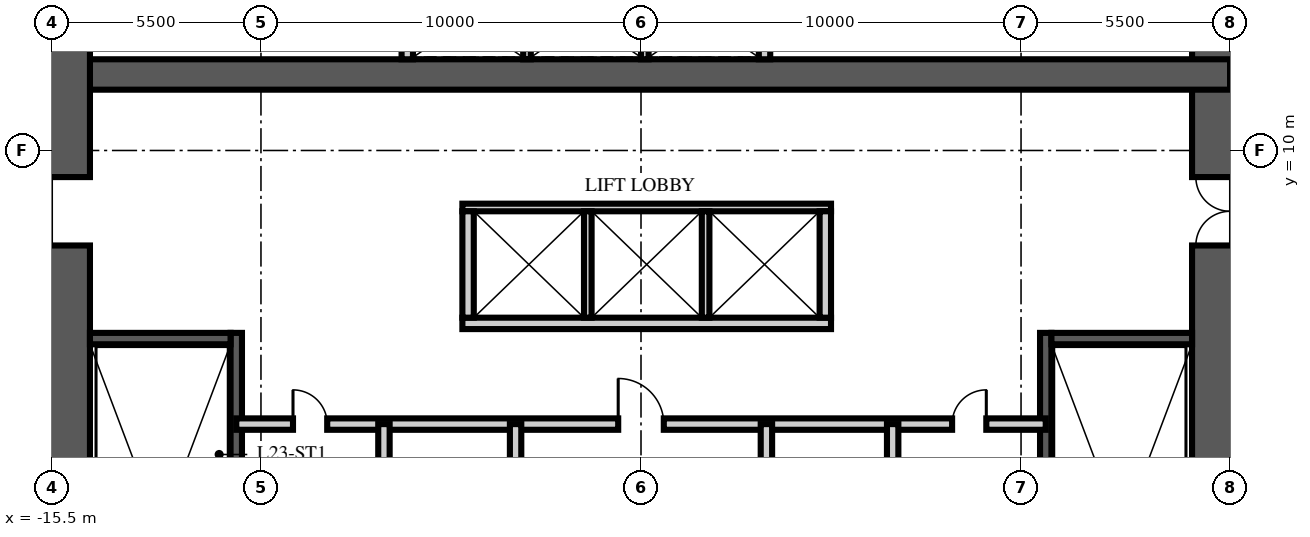
"""IFC4 building model, lengths in metres.
Left out: names, types, materials, properties, quantities, classifications, styles, units other than length and angle.
Written with IfcOpenShell. Run it as: python <this file> out.ifc"""

import sys

from ifc_helpers import new_model, si_unit, direction, frame, frame_2d, origin, place, context, subcontext, project, spatial, rectangle, extrude, element, fill, save


model = new_model("IFC4")
c1 = context("Model", 3, precision=1e-05, world=origin(), true_north=direction((0.0, 1.0)))
c2 = subcontext(c1, "Body", "Model", "MODEL_VIEW")
j1 = project(units=[si_unit("LENGTHUNIT", "METRE"), si_unit("PLANEANGLEUNIT", "RADIAN")], contexts=[c1])
p1 = place(None, origin())
s1 = spatial("IfcSite", under=j1, at=p1, CompositionType="ELEMENT")
p2 = place(p1, origin())
s2 = spatial("IfcBuilding", under=s1, at=p2, CompositionType="ELEMENT")
p3 = place(p2, frame((0.0, 0.0, 92.25)))
s3 = spatial("IfcBuildingStorey", under=s2, at=p3, CompositionType="ELEMENT", Elevation=92.25)
p4 = place(p3, frame((15.5, -15.5, -0.25), z_axis=(0.0, 0.0, 1.0), x_axis=(0.0, 1.0, 0.0)))
e1 = element("IfcWall", 1, at=p4, inside=s3, PredefinedType="SHEAR", context=c2, shape_type="SweptSolid", body=[
    extrude(rectangle(XDim=31.0, YDim=2.0, at=frame_2d((15.5, 0.0))), origin(), (0.0, 0.0, 1.0), 3.75),
])
p5 = place(p4, frame((6.5, 0.0, 0.25)))
e2 = element("IfcOpeningElement", 2, at=p5, cuts=e1, PredefinedType="OPENING", context=c2, shape_type="SweptSolid", body=[
    extrude(rectangle(XDim=1.2, YDim=2.1, at=frame_2d((0.6, 1.05))), frame((0.0, 1.01, 0.0), z_axis=(0.0, -1.0, 0.0), x_axis=(1.0, 0.0, 0.0)), (0.0, 0.0, 1.0), 2.02),
])
p6 = place(p4, frame((23.0, 0.0, 0.25)))
e3 = element("IfcOpeningElement", 3, at=p6, cuts=e1, PredefinedType="OPENING", context=c2, shape_type="SweptSolid", body=[
    extrude(rectangle(XDim=1.8, YDim=2.1, at=frame_2d((0.9, 1.05))), frame((0.0, 1.01, 0.0), z_axis=(0.0, -1.0, 0.0), x_axis=(1.0, 0.0, 0.0)), (0.0, 0.0, 1.0), 2.02),
])
p7 = place(p3, frame((-15.5, 12.0, -0.25), z_axis=(0.0, 0.0, 1.0), x_axis=(1.0, 0.0, 0.0)))
e4 = element("IfcWall", 4, at=p7, inside=s3, PredefinedType="SHEAR", context=c2, shape_type="SweptSolid", body=[
    extrude(rectangle(XDim=31.0, YDim=0.8, at=frame_2d((15.5, 0.0))), origin(), (0.0, 0.0, 1.0), 3.75),
])
p8 = place(p3, frame((-15.5, -15.5, -0.25), z_axis=(0.0, 0.0, 1.0), x_axis=(0.0, 1.0, 0.0)))
e5 = element("IfcWall", 5, at=p8, inside=s3, PredefinedType="SHEAR", context=c2, shape_type="SweptSolid", body=[
    extrude(rectangle(XDim=31.0, YDim=2.0, at=frame_2d((15.5, 0.0))), origin(), (0.0, 0.0, 1.0), 3.75),
])
p9 = place(p8, frame((6.5, 0.0, 0.25)))
e6 = element("IfcOpeningElement", 6, at=p9, cuts=e5, PredefinedType="OPENING", context=c2, shape_type="SweptSolid", body=[
    extrude(rectangle(XDim=1.2, YDim=2.1, at=frame_2d((0.6, 1.05))), frame((0.0, 1.01, 0.0), z_axis=(0.0, -1.0, 0.0), x_axis=(1.0, 0.0, 0.0)), (0.0, 0.0, 1.0), 2.02),
])
p10 = place(p8, frame((23.0, 0.0, 0.25)))
e7 = element("IfcOpeningElement", 7, at=p10, cuts=e5, PredefinedType="OPENING", context=c2, shape_type="SweptSolid", body=[
    extrude(rectangle(XDim=1.8, YDim=2.1, at=frame_2d((0.9, 1.05))), frame((0.0, 1.01, 0.0), z_axis=(0.0, -1.0, 0.0), x_axis=(1.0, 0.0, 0.0)), (0.0, 0.0, 1.0), 2.02),
])
p11 = place(p3, frame((-10.65, -4.9, 0.0), z_axis=(0.0, 0.0, 1.0), x_axis=(0.0, 1.0, 0.0)))
e8 = element("IfcWall", 8, at=p11, inside=s3, PredefinedType="SOLIDWALL", context=c2, shape_type="SweptSolid", body=[
    extrude(rectangle(XDim=10.1, YDim=0.3, at=frame_2d((5.05, 0.0))), origin(), (0.0, 0.0, 1.0), 3.5),
])
p12 = place(p3, frame((-14.5, 5.05, 0.0), z_axis=(0.0, 0.0, 1.0), x_axis=(1.0, 0.0, 0.0)))
e9 = element("IfcWall", 9, at=p12, inside=s3, PredefinedType="SOLIDWALL", context=c2, shape_type="SweptSolid", body=[
    extrude(rectangle(XDim=3.7, YDim=0.3, at=frame_2d((1.85, 0.0))), origin(), (0.0, 0.0, 1.0), 3.5),
])
p13 = place(p3, frame((10.65, -4.9, 0.0), z_axis=(0.0, 0.0, 1.0), x_axis=(0.0, 1.0, 0.0)))
e10 = element("IfcWall", 10, at=p13, inside=s3, PredefinedType="SOLIDWALL", context=c2, shape_type="SweptSolid", body=[
    extrude(rectangle(XDim=10.1, YDim=0.3, at=frame_2d((5.05, 0.0))), origin(), (0.0, 0.0, 1.0), 3.5),
])
p14 = place(p3, frame((14.5, 5.05, 0.0), z_axis=(0.0, 0.0, 1.0), x_axis=(-1.0, 0.0, 0.0)))
e11 = element("IfcWall", 11, at=p14, inside=s3, PredefinedType="SOLIDWALL", context=c2, shape_type="SweptSolid", body=[
    extrude(rectangle(XDim=3.7, YDim=0.3, at=frame_2d((1.85, 0.0))), origin(), (0.0, 0.0, 1.0), 3.5),
])
p15 = place(p3, frame((-4.7, 5.45, 0.0), z_axis=(0.0, 0.0, 1.0), x_axis=(1.0, 0.0, 0.0)))
e12 = element("IfcWall", 12, at=p15, inside=s3, PredefinedType="PARTITIONING", context=c2, shape_type="SweptSolid", body=[
    extrude(rectangle(XDim=9.7, YDim=0.3, at=frame_2d((4.85, 0.0))), origin(), (0.0, 0.0, 1.0), 3.5),
])
p16 = place(p3, frame((-4.7, 8.5, 0.0), z_axis=(0.0, 0.0, 1.0), x_axis=(1.0, 0.0, 0.0)))
e13 = element("IfcWall", 13, at=p16, inside=s3, PredefinedType="PARTITIONING", context=c2, shape_type="SweptSolid", body=[
    extrude(rectangle(XDim=9.7, YDim=0.2, at=frame_2d((4.85, 0.0))), origin(), (0.0, 0.0, 1.0), 3.5),
])
for number, where, z_axis, x_axis in (
    (14, (-4.55, 5.6, 0.0), (0.0, 0.0, 1.0), (0.0, 1.0, 0.0)),
    (15, (4.85, 5.6, 0.0), (0.0, 0.0, 1.0), (0.0, 1.0, 0.0)),
):
    element("IfcWall", number, at=place(p3, frame(where, z_axis=z_axis, x_axis=x_axis)), inside=s3, PredefinedType="PARTITIONING", context=c2, shape_type="SweptSolid", body=[
        extrude(rectangle(XDim=2.8, YDim=0.3, at=frame_2d((1.4, 0.0))), origin(), (0.0, 0.0, 1.0), 3.5),
    ])
for number, where, z_axis, x_axis in (
    (16, (-1.4, 5.6, 0.0), (0.0, 0.0, 1.0), (0.0, 1.0, 0.0)),
    (17, (1.7, 5.6, 0.0), (0.0, 0.0, 1.0), (0.0, 1.0, 0.0)),
):
    element("IfcWall", number, at=place(p3, frame(where, z_axis=z_axis, x_axis=x_axis)), inside=s3, PredefinedType="PARTITIONING", context=c2, shape_type="SweptSolid", body=[
        extrude(rectangle(XDim=2.8, YDim=0.2, at=frame_2d((1.4, 0.0))), origin(), (0.0, 0.0, 1.0), 3.5),
    ])
for number, where, z_axis, x_axis in (
    (18, (-6.15, 12.4, 0.0), (0.0, 0.0, 1.0), (0.0, 1.0, 0.0)),
    (19, (3.25, 12.4, 0.0), (0.0, 0.0, 1.0), (0.0, 1.0, 0.0)),
):
    element("IfcWall", number, at=place(p3, frame(where, z_axis=z_axis, x_axis=x_axis)), inside=s3, PredefinedType="PARTITIONING", context=c2, shape_type="SweptSolid", body=[
        extrude(rectangle(XDim=2.1, YDim=0.3, at=frame_2d((1.05, 0.0))), origin(), (0.0, 0.0, 1.0), 3.5),
    ])
for number, where, z_axis, x_axis in (
    (20, (-3.0, 12.4, 0.0), (0.0, 0.0, 1.0), (0.0, 1.0, 0.0)),
    (21, (0.1, 12.4, 0.0), (0.0, 0.0, 1.0), (0.0, 1.0, 0.0)),
):
    element("IfcWall", number, at=place(p3, frame(where, z_axis=z_axis, x_axis=x_axis)), inside=s3, PredefinedType="PARTITIONING", context=c2, shape_type="SweptSolid", body=[
        extrude(rectangle(XDim=2.1, YDim=0.2, at=frame_2d((1.05, 0.0))), origin(), (0.0, 0.0, 1.0), 3.5),
    ])
p17 = place(p3, frame((-10.65, 2.8, 0.0), z_axis=(0.0, 0.0, 1.0), x_axis=(1.0, 0.0, 0.0)))
e22 = element("IfcWall", 22, at=p17, inside=s3, PredefinedType="PARTITIONING", context=c2, shape_type="SweptSolid", body=[
    extrude(rectangle(XDim=21.3, YDim=0.3, at=frame_2d((10.65, 0.0))), origin(), (0.0, 0.0, 1.0), 3.5),
])
p18 = place(p17, frame((10.05, 0.0, 0.0)))
e23 = element("IfcOpeningElement", 23, at=p18, cuts=e22, PredefinedType="OPENING", context=c2, shape_type="SweptSolid", body=[
    extrude(rectangle(XDim=1.2, YDim=2.1, at=frame_2d((0.6, 1.05))), frame((0.0, 0.16, 0.0), z_axis=(0.0, -1.0, 0.0), x_axis=(1.0, 0.0, 0.0)), (0.0, 0.0, 1.0), 0.32),
])
p19 = place(p17, frame((1.493, 0.0, 0.0)))
e24 = element("IfcOpeningElement", 24, at=p19, cuts=e22, PredefinedType="OPENING", context=c2, shape_type="SweptSolid", body=[
    extrude(rectangle(XDim=0.9, YDim=2.1, at=frame_2d((0.45, 1.05))), frame((0.0, 0.16, 0.0), z_axis=(0.0, -1.0, 0.0), x_axis=(1.0, 0.0, 0.0)), (0.0, 0.0, 1.0), 0.32),
])
p20 = place(p17, frame((18.836, 0.0, 0.0)))
e25 = element("IfcOpeningElement", 25, at=p20, cuts=e22, PredefinedType="OPENING", context=c2, shape_type="SweptSolid", body=[
    extrude(rectangle(XDim=0.9, YDim=2.1, at=frame_2d((0.45, 1.05))), frame((0.0, 0.16, 0.0), z_axis=(0.0, -1.0, 0.0), x_axis=(1.0, 0.0, 0.0)), (0.0, 0.0, 1.0), 0.32),
])
p21 = place(p3, frame((-3.3, -6.65, 0.0), z_axis=(0.0, 0.0, 1.0), x_axis=(0.0, 1.0, 0.0)))
e26 = element("IfcWall", 26, at=p21, inside=s3, PredefinedType="PARTITIONING", context=c2, shape_type="SweptSolid", body=[
    extrude(rectangle(XDim=9.45, YDim=0.3, at=frame_2d((4.725, 0.0))), origin(), (0.0, 0.0, 1.0), 3.5),
])
p22 = place(p21, frame((4.275, 0.0, 0.0)))
e27 = element("IfcOpeningElement", 27, at=p22, cuts=e26, PredefinedType="OPENING", context=c2, shape_type="SweptSolid", body=[
    extrude(rectangle(XDim=0.9, YDim=2.1, at=frame_2d((0.45, 1.05))), frame((0.0, 0.16, 0.0), z_axis=(0.0, -1.0, 0.0), x_axis=(1.0, 0.0, 0.0)), (0.0, 0.0, 1.0), 0.32),
])
p23 = place(p3, frame((3.3, -6.65, 0.0), z_axis=(0.0, 0.0, 1.0), x_axis=(0.0, 1.0, 0.0)))
e28 = element("IfcWall", 28, at=p23, inside=s3, PredefinedType="PARTITIONING", context=c2, shape_type="SweptSolid", body=[
    extrude(rectangle(XDim=9.45, YDim=0.3, at=frame_2d((4.725, 0.0))), origin(), (0.0, 0.0, 1.0), 3.5),
])
p24 = place(p23, frame((4.275, 0.0, 0.0)))
e29 = element("IfcOpeningElement", 29, at=p24, cuts=e28, PredefinedType="OPENING", context=c2, shape_type="SweptSolid", body=[
    extrude(rectangle(XDim=0.9, YDim=2.1, at=frame_2d((0.45, 1.05))), frame((0.0, 0.16, 0.0), z_axis=(0.0, -1.0, 0.0), x_axis=(1.0, 0.0, 0.0)), (0.0, 0.0, 1.0), 0.32),
])
for number, where, z_axis, x_axis in (
    (30, (-6.764, -6.65, 0.0), (0.0, 0.0, 1.0), (0.0, 1.0, 0.0)),
    (31, (6.622, -6.65, 0.0), (0.0, 0.0, 1.0), (0.0, 1.0, 0.0)),
):
    element("IfcWall", number, at=place(p3, frame(where, z_axis=z_axis, x_axis=x_axis)), inside=s3, PredefinedType="PARTITIONING", context=c2, shape_type="SweptSolid", body=[
        extrude(rectangle(XDim=9.45, YDim=0.3, at=frame_2d((4.725, 0.0))), origin(), (0.0, 0.0, 1.0), 3.5),
    ])
p25 = place(p10, origin())
e32 = element("IfcDoor", 32, at=p25, inside=s3, OperationType="DOUBLE_DOOR_SINGLE_SWING", PredefinedType="DOOR", context=c2, shape_type="SweptSolid", body=[
    extrude(rectangle(XDim=1.8, YDim=2.1, at=frame_2d((0.9, 1.05))), frame((0.0, 0.025, 0.0), z_axis=(0.0, -1.0, 0.0), x_axis=(1.0, 0.0, 0.0)), (0.0, 0.0, 1.0), 0.05),
])
fill(e7, e32)
p26 = place(p6, origin())
e33 = element("IfcDoor", 33, at=p26, inside=s3, OperationType="DOUBLE_DOOR_SINGLE_SWING", PredefinedType="DOOR", context=c2, shape_type="SweptSolid", body=[
    extrude(rectangle(XDim=1.8, YDim=2.1, at=frame_2d((0.9, 1.05))), frame((0.0, 0.025, 0.0), z_axis=(0.0, -1.0, 0.0), x_axis=(1.0, 0.0, 0.0)), (0.0, 0.0, 1.0), 0.05),
])
fill(e3, e33)
p27 = place(p18, origin())
e34 = element("IfcDoor", 34, at=p27, inside=s3, OperationType="SINGLE_SWING_LEFT", PredefinedType="DOOR", context=c2, shape_type="SweptSolid", body=[
    extrude(rectangle(XDim=1.2, YDim=2.1, at=frame_2d((0.6, 1.05))), frame((0.0, 0.025, 0.0), z_axis=(0.0, -1.0, 0.0), x_axis=(1.0, 0.0, 0.0)), (0.0, 0.0, 1.0), 0.05),
])
fill(e23, e34)
p28 = place(p19, origin())
e35 = element("IfcDoor", 35, at=p28, inside=s3, OperationType="SINGLE_SWING_LEFT", PredefinedType="DOOR", context=c2, shape_type="SweptSolid", body=[
    extrude(rectangle(XDim=0.9, YDim=2.1, at=frame_2d((0.45, 1.05))), frame((0.0, 0.025, 0.0), z_axis=(0.0, -1.0, 0.0), x_axis=(1.0, 0.0, 0.0)), (0.0, 0.0, 1.0), 0.05),
])
fill(e24, e35)
p29 = place(p20, origin())
e36 = element("IfcDoor", 36, at=p29, inside=s3, OperationType="SINGLE_SWING_RIGHT", PredefinedType="DOOR", context=c2, shape_type="SweptSolid", body=[
    extrude(rectangle(XDim=0.9, YDim=2.1, at=frame_2d((0.45, 1.05))), frame((0.0, 0.025, 0.0), z_axis=(0.0, -1.0, 0.0), x_axis=(1.0, 0.0, 0.0)), (0.0, 0.0, 1.0), 0.05),
])
fill(e25, e36)
save(model, sys.argv[1])
